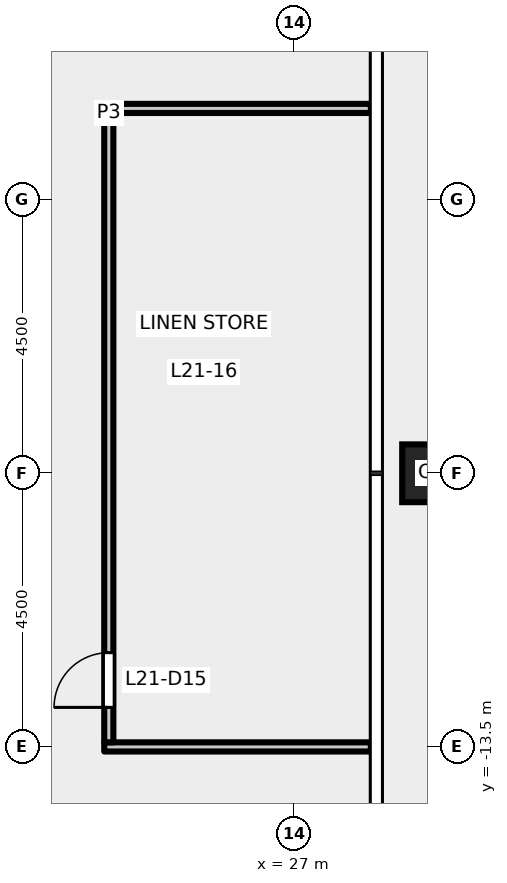
"""IFC4 building model, lengths in metres.
Left out: names, types, materials, properties, quantities, classifications, styles, units other than length and angle.
Written with IfcOpenShell. Run it as: python <this file> out.ifc"""

import sys

from ifc_helpers import new_model, si_unit, direction, frame, frame_2d, origin, origin_2d, place, context, subcontext, project, spatial, rectangle, hollow_rectangle, extrude, element, fill, save


model = new_model("IFC4")
c1 = context("Model", 3, precision=1e-05, world=origin(), true_north=direction((0.0, 1.0)))
c2 = subcontext(c1, "Body", "Model", "MODEL_VIEW")
j1 = project(units=[si_unit("LENGTHUNIT", "METRE"), si_unit("PLANEANGLEUNIT", "RADIAN")], contexts=[c1])
p1 = place(None, origin())
s1 = spatial("IfcSite", under=j1, at=p1, CompositionType="ELEMENT")
p2 = place(p1, origin())
s2 = spatial("IfcBuilding", under=s1, at=p2, CompositionType="ELEMENT")
p3 = place(p2, frame((0.0, 0.0, 99.2)))
s3 = spatial("IfcBuildingStorey", under=s2, at=p3, CompositionType="ELEMENT", Elevation=99.2)
p4 = place(p3, frame((29.25, -9.0, -0.2), z_axis=(0.0, 0.0, 1.0), x_axis=(1.0, 0.0, 0.0)))
e1 = element("IfcColumn", 1, at=p4, inside=s3, PredefinedType="COLUMN", context=c2, shape_type="SweptSolid", body=[
    extrude(hollow_rectangle(XDim=0.95, YDim=0.95, WallThickness=0.055, at=origin_2d()), origin(), (0.0, 0.0, 1.0), 5.7),
])
p5 = place(p3, frame((23.875, -13.5, 0.0), z_axis=(0.0, 0.0, 1.0), x_axis=(1.0, 0.0, 0.0)))
e2 = element("IfcWall", 2, at=p5, inside=s3, PredefinedType="PARTITIONING", context=c2, shape_type="SweptSolid", body=[
    extrude(rectangle(XDim=4.385, YDim=0.15, at=frame_2d((2.192, 0.0))), origin(), (0.0, 0.0, 1.0), 4.9),
])
p6 = place(p3, frame((23.875, -3.0, 0.0), z_axis=(0.0, 0.0, 1.0), x_axis=(1.0, 0.0, 0.0)))
e3 = element("IfcWall", 3, at=p6, inside=s3, PredefinedType="PARTITIONING", context=c2, shape_type="SweptSolid", body=[
    extrude(rectangle(XDim=4.385, YDim=0.15, at=frame_2d((2.192, 0.0))), origin(), (0.0, 0.0, 1.0), 5.35),
])
p7 = place(p3, frame((23.95, -13.425, 0.0), z_axis=(0.0, 0.0, 1.0), x_axis=(0.0, 1.0, 0.0)))
e4 = element("IfcWall", 4, at=p7, inside=s3, PredefinedType="PARTITIONING", context=c2, shape_type="SweptSolid", body=[
    extrude(rectangle(XDim=10.35, YDim=0.15, at=frame_2d((5.175, 0.0))), origin(), (0.0, 0.0, 1.0), 5.35),
])
p8 = place(p7, frame((0.575, 0.0, 0.0)))
e5 = element("IfcOpeningElement", 5, at=p8, cuts=e4, PredefinedType="OPENING", context=c2, shape_type="SweptSolid", body=[
    extrude(rectangle(XDim=0.9, YDim=2.1, at=frame_2d((0.45, 1.05))), frame((0.0, 0.085, 0.0), z_axis=(0.0, -1.0, 0.0), x_axis=(1.0, 0.0, 0.0)), (0.0, 0.0, 1.0), 0.17),
])
p9 = place(p8, origin())
e6 = element("IfcDoor", 6, at=p9, inside=s3, OperationType="SINGLE_SWING_LEFT", PredefinedType="DOOR", context=c2, shape_type="SweptSolid", body=[
    extrude(rectangle(XDim=0.9, YDim=2.1, at=frame_2d((0.45, 1.05))), frame((0.0, 0.025, 0.0), z_axis=(0.0, -1.0, 0.0), x_axis=(1.0, 0.0, 0.0)), (0.0, 0.0, 1.0), 0.05),
])
fill(e5, e6)
save(model, sys.argv[1])
